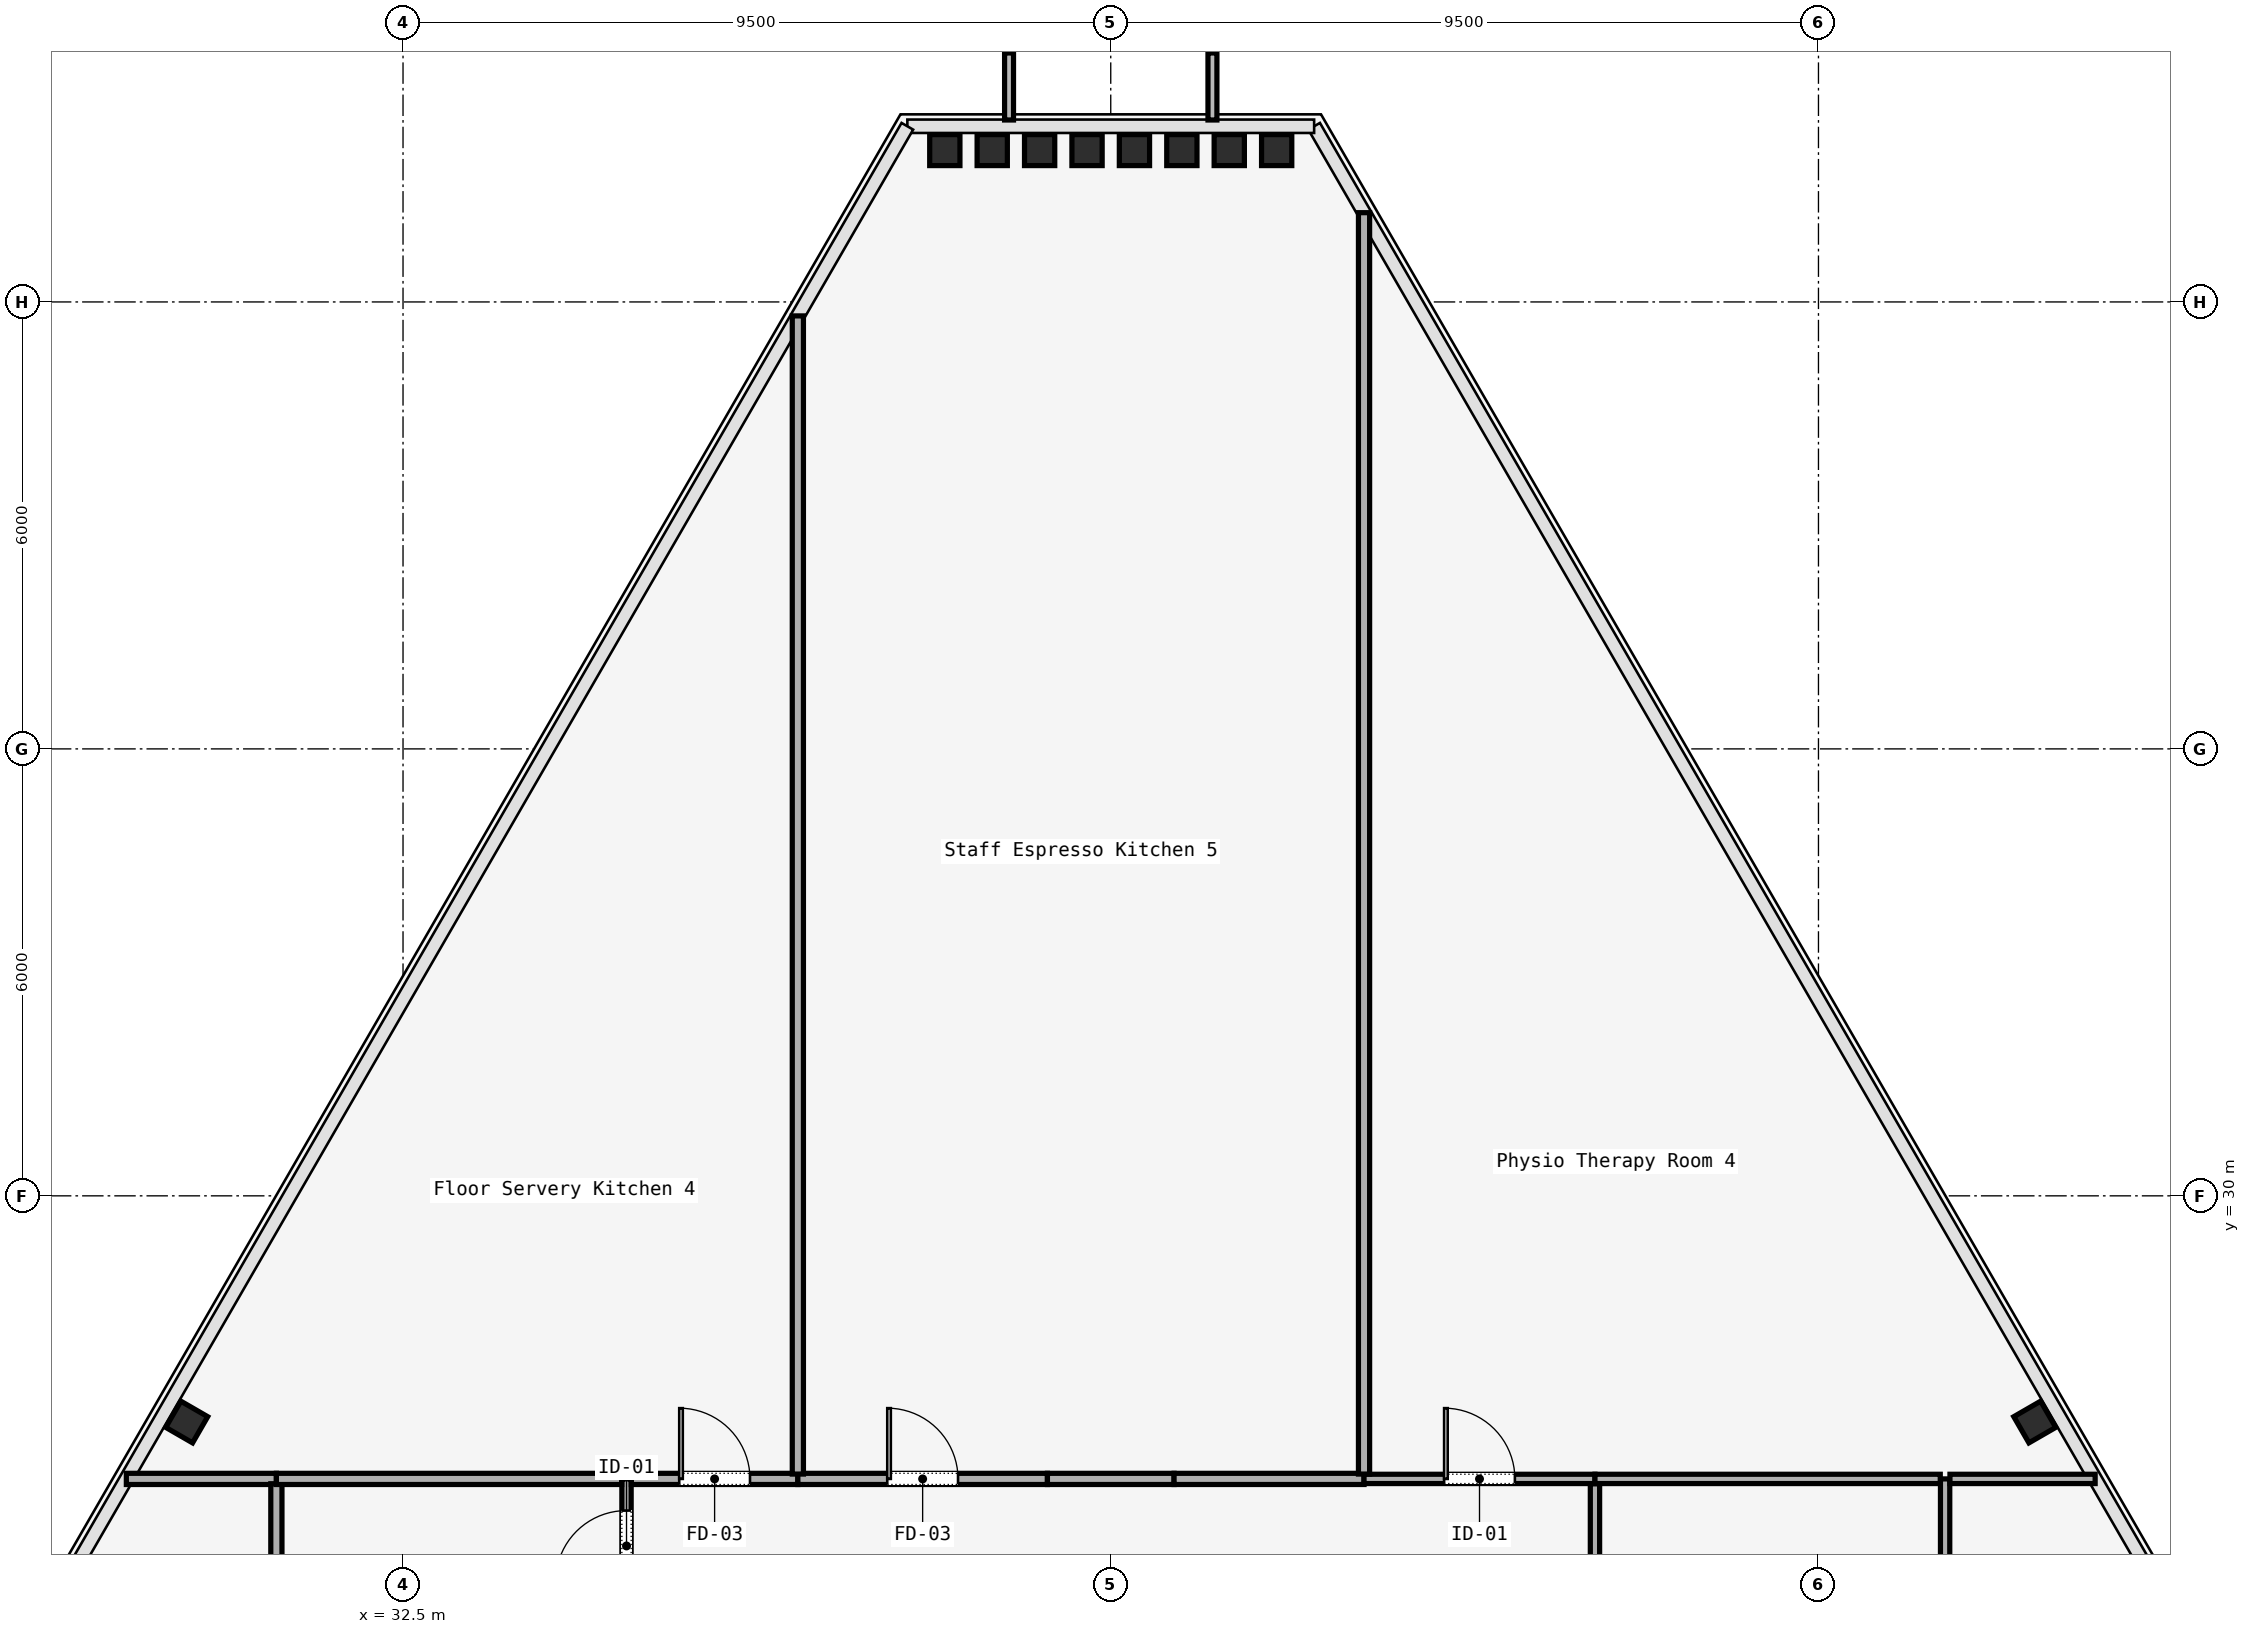
"""IFC4 building model, lengths in metres.
Left out: names, types, materials, properties, quantities, classifications, styles, units other than length and angle.
Written with IfcOpenShell. Run it as: python <this file> out.ifc"""

import sys

from ifc_helpers import new_model, si_unit, direction, frame, frame_2d, origin, origin_2d, place, context, subcontext, project, spatial, rectangle, i_section, extrude, element, fill, save


model = new_model("IFC4")
c1 = context("Model", 3, precision=1e-05, world=origin(), true_north=direction((0.0, 1.0)))
c2 = subcontext(c1, "Body", "Model", "MODEL_VIEW")
j1 = project(units=[si_unit("LENGTHUNIT", "METRE"), si_unit("PLANEANGLEUNIT", "RADIAN")], contexts=[c1])
p1 = place(None, origin())
s1 = spatial("IfcSite", under=j1, at=p1, CompositionType="ELEMENT")
p2 = place(p1, origin())
s2 = spatial("IfcBuilding", under=s1, at=p2, CompositionType="ELEMENT")
p3 = place(p2, frame((0.0, 0.0, 263.6)))
s3 = spatial("IfcBuildingStorey", under=s2, at=p3, CompositionType="ELEMENT", Elevation=263.6)
for number, where, z_axis, x_axis in (
    (1, (54.404, 26.964, 0.0), (0.0, 0.0, 1.0), (-0.5, 0.866, 0.0)),
    (2, (44.227, 44.038, 0.0), (0.0, 0.0, 1.0), (1.0, 0.0, 0.0)),
    (3, (43.591, 44.038, 0.0), (0.0, 0.0, 1.0), (1.0, 0.0, 0.0)),
    (4, (42.955, 44.038, 0.0), (0.0, 0.0, 1.0), (1.0, 0.0, 0.0)),
    (5, (42.318, 44.038, 0.0), (0.0, 0.0, 1.0), (1.0, 0.0, 0.0)),
    (6, (41.682, 44.038, 0.0), (0.0, 0.0, 1.0), (1.0, 0.0, 0.0)),
    (7, (41.045, 44.038, 0.0), (0.0, 0.0, 1.0), (1.0, 0.0, 0.0)),
    (8, (40.409, 44.038, 0.0), (0.0, 0.0, 1.0), (1.0, 0.0, 0.0)),
    (9, (39.773, 44.038, 0.0), (0.0, 0.0, 1.0), (1.0, 0.0, 0.0)),
    (10, (29.596, 26.964, 0.0), (0.0, 0.0, 1.0), (0.5, 0.866, 0.0)),
):
    element("IfcColumn", number, at=place(p3, frame(where, z_axis=z_axis, x_axis=x_axis)), inside=s3, PredefinedType="COLUMN", context=c2, shape_type="SweptSolid", body=[
        extrude(i_section(OverallWidth=0.406, OverallDepth=0.416, WebThickness=0.03, FlangeThickness=0.037, FilletRadius=0.015, at=origin_2d()), origin(), (0.0, 0.0, 1.0), 3.58),
    ])
p4 = place(p3, frame((35.5, 24.4, 0.0), z_axis=(0.0, 0.0, 1.0), x_axis=(0.0, 1.0, 0.0)))
e11 = element("IfcWall", 11, at=p4, inside=s3, PredefinedType="PARTITIONING", context=c2, shape_type="SweptSolid", body=[
    extrude(rectangle(XDim=1.8, YDim=0.125, at=frame_2d((0.9, 0.0))), origin(), (0.0, 0.0, 1.0), 3.01),
])
p5 = place(p4, frame((0.425, 0.0, 0.0)))
e12 = element("IfcOpeningElement", 12, at=p5, cuts=e11, PredefinedType="OPENING", context=c2, shape_type="SweptSolid", body=[
    extrude(rectangle(XDim=0.95, YDim=2.2, at=frame_2d((0.475, 1.1))), frame((0.0, 0.062, 0.0), z_axis=(0.0, -1.0, 0.0), x_axis=(1.0, 0.0, 0.0)), (0.0, 0.0, 1.0), 0.125),
])
p6 = place(p3, frame((35.565, 26.2, 0.0), z_axis=(0.0, 0.0, 1.0), x_axis=(1.0, 0.0, 0.0)))
e13 = element("IfcWall", 13, at=p6, inside=s3, PredefinedType="PARTITIONING", context=c2, shape_type="SweptSolid", body=[
    extrude(rectangle(XDim=2.235, YDim=0.15, at=frame_2d((1.118, 0.0))), origin(), (0.0, 0.0, 1.0), 3.01),
])
p7 = place(p6, frame((0.643, 0.0, 0.0)))
e14 = element("IfcOpeningElement", 14, at=p7, cuts=e13, PredefinedType="OPENING", context=c2, shape_type="SweptSolid", body=[
    extrude(rectangle(XDim=0.95, YDim=2.2, at=frame_2d((0.475, 1.1))), frame((0.0, 0.075, 0.0), z_axis=(0.0, -1.0, 0.0), x_axis=(1.0, 0.0, 0.0)), (0.0, 0.0, 1.0), 0.15),
])
p8 = place(p3, frame((37.8, 26.2, 0.0), z_axis=(0.0, 0.0, 1.0), x_axis=(1.0, 0.0, 0.0)))
e15 = element("IfcWall", 15, at=p8, inside=s3, PredefinedType="PARTITIONING", context=c2, shape_type="SweptSolid", body=[
    extrude(rectangle(XDim=3.35, YDim=0.15, at=frame_2d((1.675, 0.0))), origin(), (0.0, 0.0, 1.0), 3.01),
])
p9 = place(p8, frame((1.2, 0.0, 0.0)))
e16 = element("IfcOpeningElement", 16, at=p9, cuts=e15, PredefinedType="OPENING", context=c2, shape_type="SweptSolid", body=[
    extrude(rectangle(XDim=0.95, YDim=2.2, at=frame_2d((0.475, 1.1))), frame((0.0, 0.075, 0.0), z_axis=(0.0, -1.0, 0.0), x_axis=(1.0, 0.0, 0.0)), (0.0, 0.0, 1.0), 0.15),
])
p10 = place(p3, frame((41.15, 26.2, 0.0), z_axis=(0.0, 0.0, 1.0), x_axis=(1.0, 0.0, 0.0)))
e17 = element("IfcWall", 17, at=p10, inside=s3, PredefinedType="PARTITIONING", context=c2, shape_type="SweptSolid", body=[
    extrude(rectangle(XDim=1.7, YDim=0.15, at=frame_2d((0.85, 0.0))), origin(), (0.0, 0.0, 1.0), 3.01),
])
p11 = place(p3, frame((42.85, 26.2, 0.0), z_axis=(0.0, 0.0, 1.0), x_axis=(1.0, 0.0, 0.0)))
e18 = element("IfcWall", 18, at=p11, inside=s3, PredefinedType="PARTITIONING", context=c2, shape_type="SweptSolid", body=[
    extrude(rectangle(XDim=2.55, YDim=0.15, at=frame_2d((1.275, 0.0))), origin(), (0.0, 0.0, 1.0), 3.01),
])
p12 = place(p3, frame((45.4, 26.2, 0.0), z_axis=(0.0, 0.0, 1.0), x_axis=(1.0, 0.0, 0.0)))
e19 = element("IfcWall", 19, at=p12, inside=s3, PredefinedType="PARTITIONING", context=c2, shape_type="SweptSolid", body=[
    extrude(rectangle(XDim=3.1, YDim=0.125, at=frame_2d((1.55, 0.0))), origin(), (0.0, 0.0, 1.0), 3.01),
])
p13 = place(p12, frame((1.075, 0.0, 0.0)))
e20 = element("IfcOpeningElement", 20, at=p13, cuts=e19, PredefinedType="OPENING", context=c2, shape_type="SweptSolid", body=[
    extrude(rectangle(XDim=0.95, YDim=2.2, at=frame_2d((0.475, 1.1))), frame((0.0, 0.062, 0.0), z_axis=(0.0, -1.0, 0.0), x_axis=(1.0, 0.0, 0.0)), (0.0, 0.0, 1.0), 0.125),
])
p14 = place(p3, frame((48.5, 26.135, 0.0), z_axis=(0.0, 0.0, 1.0), x_axis=(0.0, -1.0, 0.0)))
e21 = element("IfcWall", 21, at=p14, inside=s3, PredefinedType="PARTITIONING", context=c2, shape_type="SweptSolid", body=[
    extrude(rectangle(XDim=1.735, YDim=0.125, at=frame_2d((0.868, 0.0))), origin(), (0.0, 0.0, 1.0), 3.01),
])
p15 = place(p3, frame((28.786, 26.2, 0.0), z_axis=(0.0, 0.0, 1.0), x_axis=(1.0, 0.0, 0.0)))
e22 = element("IfcWall", 22, at=p15, inside=s3, PredefinedType="PARTITIONING", context=c2, shape_type="SweptSolid", body=[
    extrude(rectangle(XDim=2.014, YDim=0.15, at=frame_2d((1.007, 0.0))), origin(), (0.0, 0.0, 1.0), 3.01),
])
p16 = place(p3, frame((30.8, 26.135, 0.0), z_axis=(0.0, 0.0, 1.0), x_axis=(0.0, -1.0, 0.0)))
e23 = element("IfcWall", 23, at=p16, inside=s3, PredefinedType="PARTITIONING", context=c2, shape_type="SweptSolid", body=[
    extrude(rectangle(XDim=7.111, YDim=0.15, at=frame_2d((3.556, 0.0))), origin(), (0.0, 0.0, 1.0), 3.01),
])
p17 = place(p3, frame((53.2, 17.065, 0.0), z_axis=(0.0, 0.0, 1.0), x_axis=(0.0, 1.0, 0.0)))
e24 = element("IfcWall", 24, at=p17, inside=s3, PredefinedType="PARTITIONING", context=c2, shape_type="SweptSolid", body=[
    extrude(rectangle(XDim=9.135, YDim=0.125, at=frame_2d((4.567, 0.0))), origin(), (0.0, 0.0, 1.0), 3.01),
])
p18 = place(p3, frame((53.265, 26.2, 0.0), z_axis=(0.0, 0.0, 1.0), x_axis=(1.0, 0.0, 0.0)))
e25 = element("IfcWall", 25, at=p18, inside=s3, PredefinedType="PARTITIONING", context=c2, shape_type="SweptSolid", body=[
    extrude(rectangle(XDim=1.949, YDim=0.125, at=frame_2d((0.975, 0.0))), origin(), (0.0, 0.0, 1.0), 3.01),
])
p19 = place(p3, frame((48.5, 26.2, 0.0), z_axis=(0.0, 0.0, 1.0), x_axis=(1.0, 0.0, 0.0)))
e26 = element("IfcWall", 26, at=p19, inside=s3, PredefinedType="PARTITIONING", context=c2, shape_type="SweptSolid", body=[
    extrude(rectangle(XDim=4.635, YDim=0.125, at=frame_2d((2.317, 0.0))), origin(), (0.0, 0.0, 1.0), 3.01),
])
p20 = place(p3, frame((30.8, 26.2, 0.0), z_axis=(0.0, 0.0, 1.0), x_axis=(1.0, 0.0, 0.0)))
e27 = element("IfcWall", 27, at=p20, inside=s3, PredefinedType="PARTITIONING", context=c2, shape_type="SweptSolid", body=[
    extrude(rectangle(XDim=4.635, YDim=0.15, at=frame_2d((2.317, 0.0))), origin(), (0.0, 0.0, 1.0), 3.01),
])
p21 = place(p3, frame((37.8, 41.813, 0.0), z_axis=(0.0, 0.0, 1.0), x_axis=(0.0, -1.0, 0.0)))
e28 = element("IfcWall", 28, at=p21, inside=s3, PredefinedType="PARTITIONING", context=c2, shape_type="SweptSolid", body=[
    extrude(rectangle(XDim=15.548, YDim=0.15, at=frame_2d((7.774, 0.0))), origin(), (0.0, 0.0, 1.0), 3.01),
])
p22 = place(p3, frame((45.4, 26.265, 0.0), z_axis=(0.0, 0.0, 1.0), x_axis=(0.0, 1.0, 0.0)))
e29 = element("IfcWall", 29, at=p22, inside=s3, PredefinedType="PARTITIONING", context=c2, shape_type="SweptSolid", body=[
    extrude(rectangle(XDim=16.933, YDim=0.15, at=frame_2d((8.467, 0.0))), origin(), (0.0, 0.0, 1.0), 3.01),
])
p23 = place(p5, origin())
e30 = element("IfcDoor", 30, at=p23, inside=s3, OperationType="SINGLE_SWING_RIGHT", PredefinedType="DOOR", context=c2, shape_type="SweptSolid", body=[
    extrude(rectangle(XDim=0.95, YDim=2.2, at=frame_2d((0.475, 1.1))), frame((0.0, 0.025, 0.0), z_axis=(0.0, -1.0, 0.0), x_axis=(1.0, 0.0, 0.0)), (0.0, 0.0, 1.0), 0.05),
])
fill(e12, e30)
p24 = place(p7, origin())
e31 = element("IfcDoor", 31, at=p24, inside=s3, OperationType="SINGLE_SWING_LEFT", PredefinedType="DOOR", context=c2, shape_type="SweptSolid", body=[
    extrude(rectangle(XDim=0.95, YDim=2.2, at=frame_2d((0.475, 1.1))), frame((0.0, 0.025, 0.0), z_axis=(0.0, -1.0, 0.0), x_axis=(1.0, 0.0, 0.0)), (0.0, 0.0, 1.0), 0.05),
])
fill(e14, e31)
p25 = place(p13, origin())
e32 = element("IfcDoor", 32, at=p25, inside=s3, OperationType="SINGLE_SWING_RIGHT", PredefinedType="DOOR", context=c2, shape_type="SweptSolid", body=[
    extrude(rectangle(XDim=0.95, YDim=2.2, at=frame_2d((0.475, 1.1))), frame((0.0, 0.025, 0.0), z_axis=(0.0, -1.0, 0.0), x_axis=(1.0, 0.0, 0.0)), (0.0, 0.0, 1.0), 0.05),
])
fill(e20, e32)
p26 = place(p9, origin())
e33 = element("IfcDoor", 33, at=p26, inside=s3, OperationType="SINGLE_SWING_LEFT", PredefinedType="DOOR", context=c2, shape_type="SweptSolid", body=[
    extrude(rectangle(XDim=0.95, YDim=2.2, at=frame_2d((0.475, 1.1))), frame((0.0, 0.025, 0.0), z_axis=(0.0, -1.0, 0.0), x_axis=(1.0, 0.0, 0.0)), (0.0, 0.0, 1.0), 0.05),
])
fill(e16, e33)
save(model, sys.argv[1])
